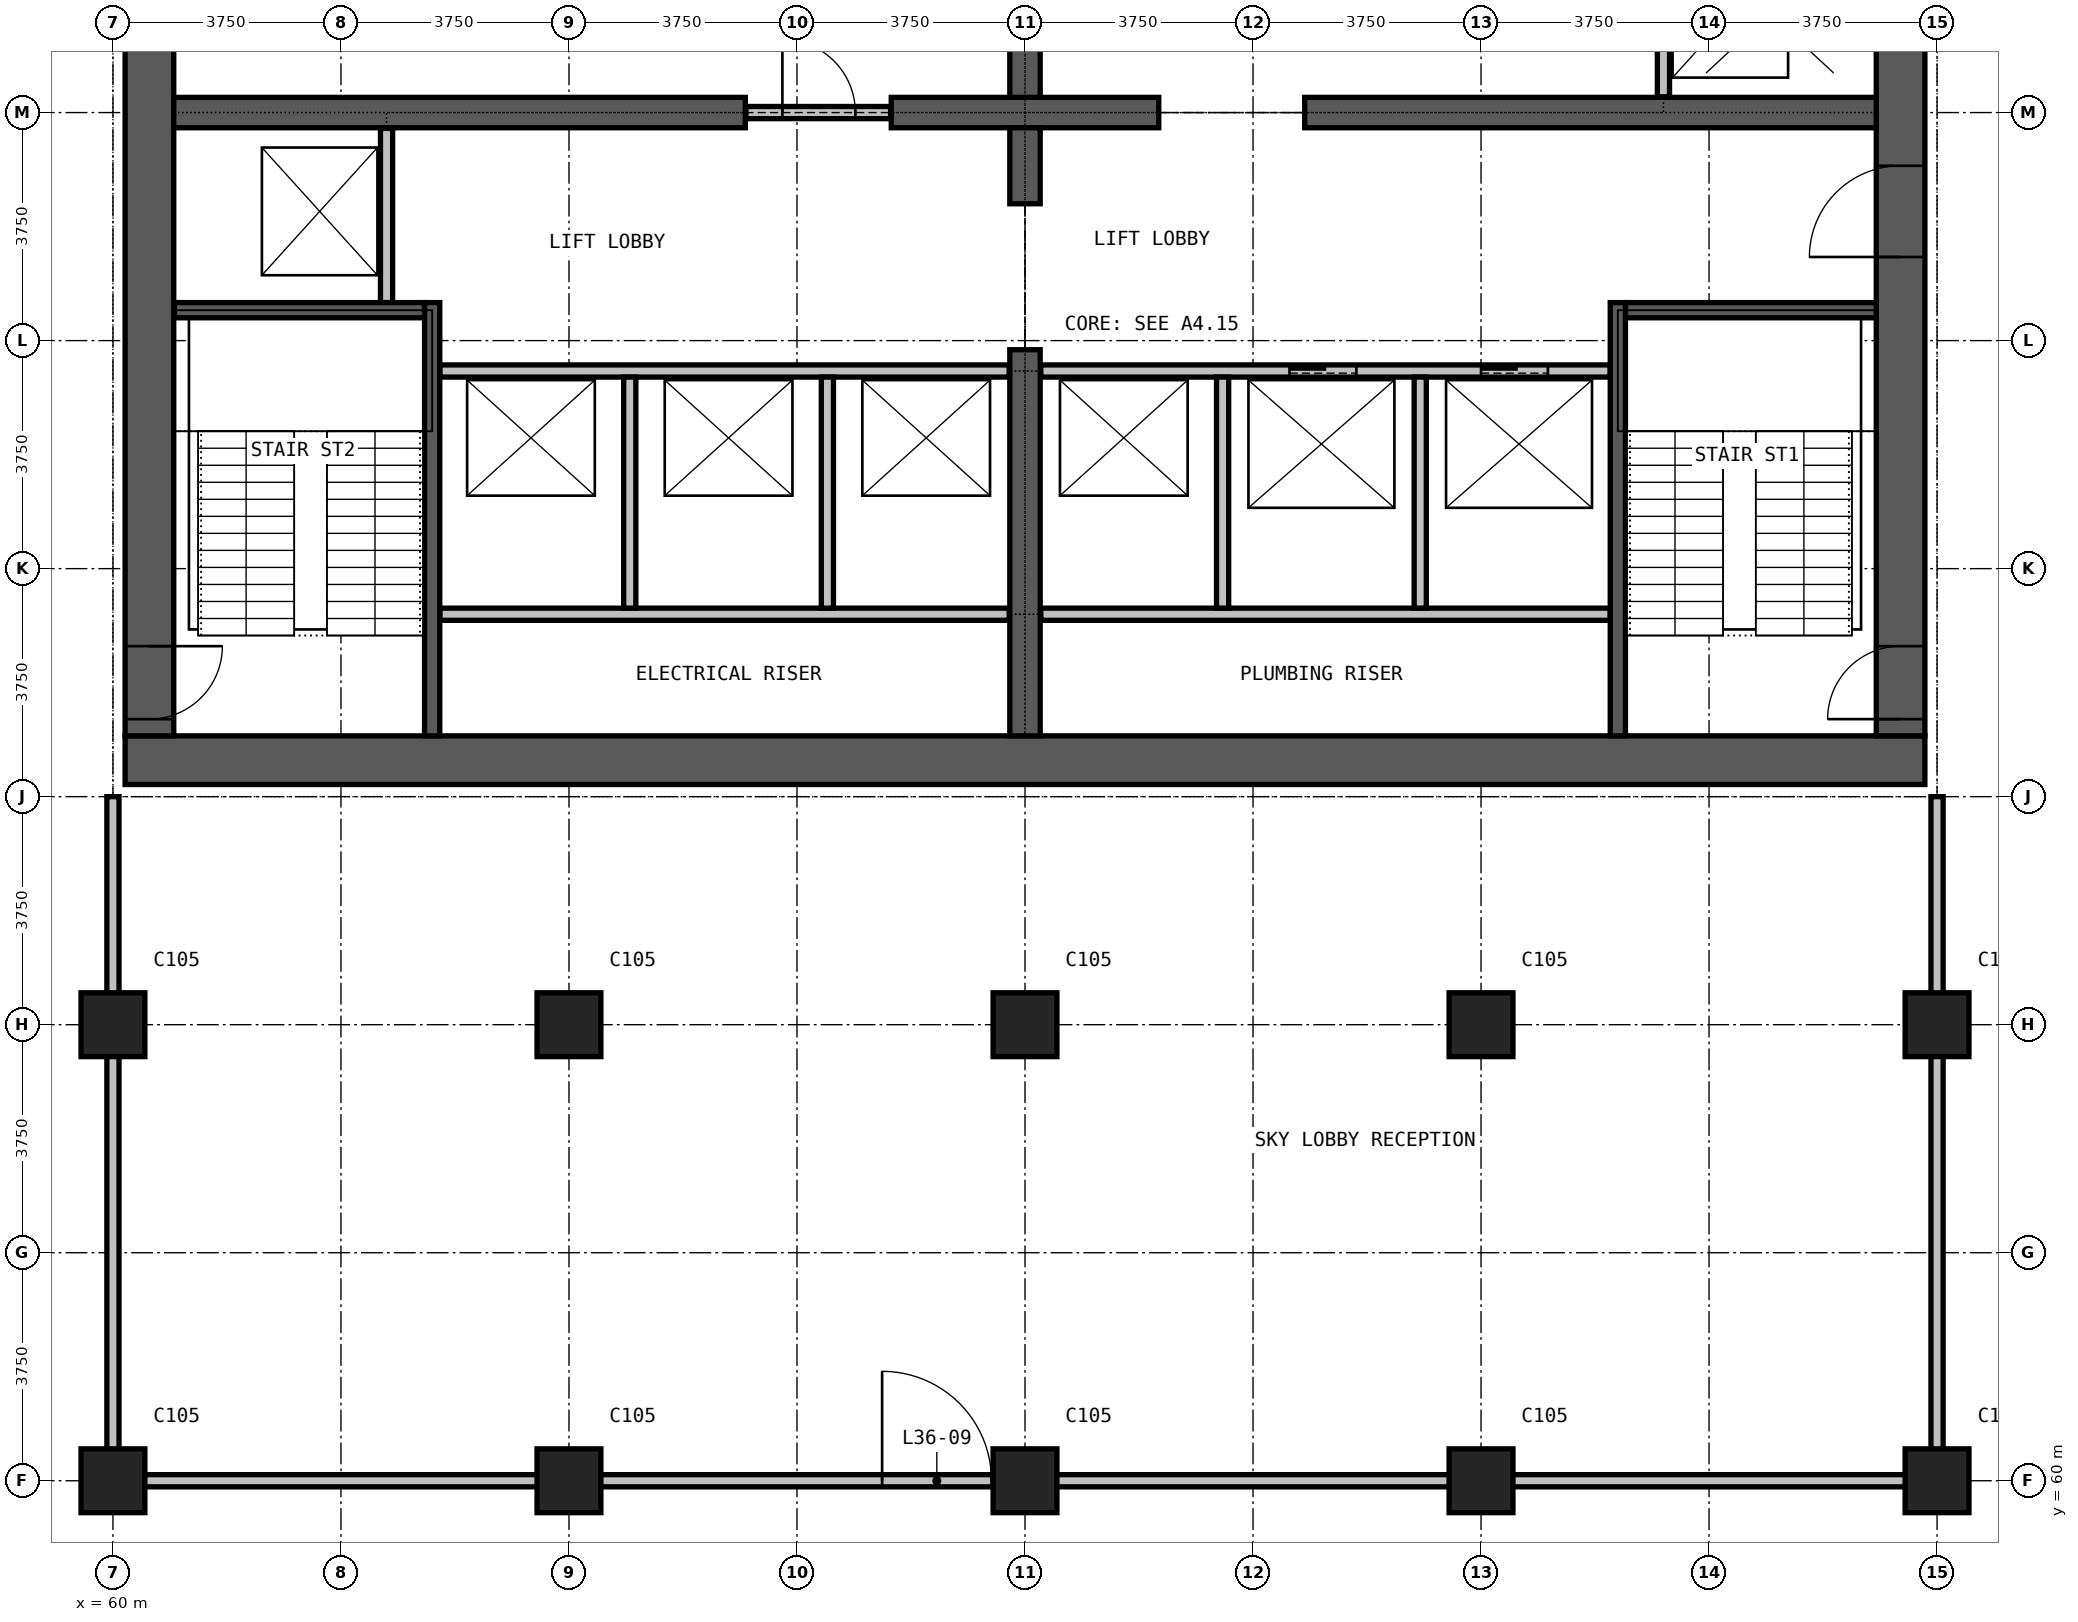
"""IFC4 building model, lengths in metres.
Left out: names, types, materials, properties, quantities, classifications, styles, units other than length and angle.
Written with IfcOpenShell. Run it as: python <this file> out.ifc"""

import sys

from ifc_helpers import new_model, si_unit, direction, frame, frame_2d, origin, origin_2d, place, context, subcontext, project, spatial, rectangle, extrude, element, fill, save


model = new_model("IFC4")
c1 = context("Model", 3, precision=1e-05, world=origin(), true_north=direction((0.0, 1.0)))
c2 = subcontext(c1, "Body", "Model", "MODEL_VIEW")
j1 = project(units=[si_unit("LENGTHUNIT", "METRE"), si_unit("PLANEANGLEUNIT", "RADIAN")], contexts=[c1])
p1 = place(None, origin())
s1 = spatial("IfcSite", under=j1, at=p1, CompositionType="ELEMENT")
p2 = place(p1, origin())
s2 = spatial("IfcBuilding", under=s1, at=p2, CompositionType="ELEMENT")
p3 = place(p2, frame((0.0, 0.0, 143.2)))
s3 = spatial("IfcBuildingStorey", under=s2, at=p3, CompositionType="ELEMENT", Elevation=143.2)
for number, where, z_axis, x_axis in (
    (1, (60.0, 60.0, 0.0), (0.0, 0.0, 1.0), (1.0, 0.0, 0.0)),
    (2, (60.0, 67.5, 0.0), (0.0, 0.0, 1.0), (1.0, 0.0, 0.0)),
    (3, (67.5, 60.0, 0.0), (0.0, 0.0, 1.0), (1.0, 0.0, 0.0)),
    (4, (67.5, 67.5, 0.0), (0.0, 0.0, 1.0), (1.0, 0.0, 0.0)),
    (5, (75.0, 60.0, 0.0), (0.0, 0.0, 1.0), (1.0, 0.0, 0.0)),
    (6, (75.0, 67.5, 0.0), (0.0, 0.0, 1.0), (1.0, 0.0, 0.0)),
    (7, (82.5, 60.0, 0.0), (0.0, 0.0, 1.0), (1.0, 0.0, 0.0)),
    (8, (82.5, 67.5, 0.0), (0.0, 0.0, 1.0), (1.0, 0.0, 0.0)),
    (9, (90.0, 60.0, 0.0), (0.0, 0.0, 1.0), (1.0, 0.0, 0.0)),
    (10, (90.0, 67.5, 0.0), (0.0, 0.0, 1.0), (1.0, 0.0, 0.0)),
):
    element("IfcColumn", number, at=place(p3, frame(where, z_axis=z_axis, x_axis=x_axis)), inside=s3, PredefinedType="COLUMN", context=c2, shape_type="SweptSolid", body=[
        extrude(rectangle(XDim=1.05, YDim=1.05, at=origin_2d()), origin(), (0.0, 0.0, 1.0), 4.5),
    ])
p4 = place(p3, frame((60.2, 71.85, 0.0), z_axis=(0.0, 0.0, 1.0), x_axis=(1.0, 0.0, 0.0)))
e11 = element("IfcWall", 11, at=p4, inside=s3, PredefinedType="SHEAR", context=c2, shape_type="SweptSolid", body=[
    extrude(rectangle(XDim=29.6, YDim=0.8, at=frame_2d((14.8, 0.0))), origin(), (0.0, 0.0, 1.0), 4.5),
])
p5 = place(p3, frame((89.4, 72.25, 0.0), z_axis=(0.0, 0.0, 1.0), x_axis=(0.0, 1.0, 0.0)))
e12 = element("IfcWall", 12, at=p5, inside=s3, PredefinedType="SHEAR", context=c2, shape_type="SweptSolid", body=[
    extrude(rectangle(XDim=20.5, YDim=0.8, at=frame_2d((10.25, 0.0))), origin(), (0.0, 0.0, 1.0), 4.5),
])
p6 = place(p5, frame((0.275, 0.0, 0.0)))
e13 = element("IfcOpeningElement", 13, at=p6, cuts=e12, PredefinedType="OPENING", context=c2, shape_type="SweptSolid", body=[
    extrude(rectangle(XDim=1.2, YDim=2.2, at=frame_2d((0.6, 1.1))), frame((0.0, 0.41, 0.0), z_axis=(0.0, -1.0, 0.0), x_axis=(1.0, 0.0, 0.0)), (0.0, 0.0, 1.0), 0.82),
])
p7 = place(p5, frame((13.775, 0.0, 0.0)))
e14 = element("IfcOpeningElement", 14, at=p7, cuts=e12, PredefinedType="OPENING", context=c2, shape_type="SweptSolid", body=[
    extrude(rectangle(XDim=1.2, YDim=2.2, at=frame_2d((0.6, 1.1))), frame((0.0, 0.41, 0.0), z_axis=(0.0, -1.0, 0.0), x_axis=(1.0, 0.0, 0.0)), (0.0, 0.0, 1.0), 0.82),
])
p8 = place(p5, frame((7.875, 0.0, 0.0)))
e15 = element("IfcOpeningElement", 15, at=p8, cuts=e12, PredefinedType="OPENING", context=c2, shape_type="SweptSolid", body=[
    extrude(rectangle(XDim=1.5, YDim=2.2, at=frame_2d((0.75, 1.1))), frame((0.0, 0.41, 0.0), z_axis=(0.0, -1.0, 0.0), x_axis=(1.0, 0.0, 0.0)), (0.0, 0.0, 1.0), 0.82),
])
p9 = place(p3, frame((60.6, 92.75, 0.0), z_axis=(0.0, 0.0, 1.0), x_axis=(0.0, -1.0, 0.0)))
e16 = element("IfcWall", 16, at=p9, inside=s3, PredefinedType="SHEAR", context=c2, shape_type="SweptSolid", body=[
    extrude(rectangle(XDim=20.5, YDim=0.8, at=frame_2d((10.25, 0.0))), origin(), (0.0, 0.0, 1.0), 4.5),
])
p10 = place(p9, frame((19.025, 0.0, 0.0)))
e17 = element("IfcOpeningElement", 17, at=p10, cuts=e16, PredefinedType="OPENING", context=c2, shape_type="SweptSolid", body=[
    extrude(rectangle(XDim=1.2, YDim=2.2, at=frame_2d((0.6, 1.1))), frame((0.0, 0.41, 0.0), z_axis=(0.0, -1.0, 0.0), x_axis=(1.0, 0.0, 0.0)), (0.0, 0.0, 1.0), 0.82),
])
p11 = place(p9, frame((8.025, 0.0, 0.0)))
e18 = element("IfcOpeningElement", 18, at=p11, cuts=e16, PredefinedType="OPENING", context=c2, shape_type="SweptSolid", body=[
    extrude(rectangle(XDim=1.2, YDim=2.2, at=frame_2d((0.6, 1.1))), frame((0.0, 0.41, 0.0), z_axis=(0.0, -1.0, 0.0), x_axis=(1.0, 0.0, 0.0)), (0.0, 0.0, 1.0), 0.82),
])
p12 = place(p3, frame((61.0, 82.5, 0.0), z_axis=(0.0, 0.0, 1.0), x_axis=(1.0, 0.0, 0.0)))
e19 = element("IfcWall", 19, at=p12, inside=s3, PredefinedType="SHEAR", context=c2, shape_type="SweptSolid", body=[
    extrude(rectangle(XDim=9.4, YDim=0.5, at=frame_2d((4.7, 0.0))), origin(), (0.0, 0.0, 1.0), 4.5),
])
p13 = place(p3, frame((72.8, 82.5, 0.0), z_axis=(0.0, 0.0, 1.0), x_axis=(1.0, 0.0, 0.0)))
e20 = element("IfcWall", 20, at=p13, inside=s3, PredefinedType="SHEAR", context=c2, shape_type="SweptSolid", body=[
    extrude(rectangle(XDim=4.4, YDim=0.5, at=frame_2d((2.2, 0.0))), origin(), (0.0, 0.0, 1.0), 4.5),
])
p14 = place(p3, frame((79.6, 82.5, 0.0), z_axis=(0.0, 0.0, 1.0), x_axis=(1.0, 0.0, 0.0)))
e21 = element("IfcWall", 21, at=p14, inside=s3, PredefinedType="SHEAR", context=c2, shape_type="SweptSolid", body=[
    extrude(rectangle(XDim=9.4, YDim=0.5, at=frame_2d((4.7, 0.0))), origin(), (0.0, 0.0, 1.0), 4.5),
])
p15 = place(p3, frame((75.0, 72.25, 0.0), z_axis=(0.0, 0.0, 1.0), x_axis=(0.0, 1.0, 0.0)))
e22 = element("IfcWall", 22, at=p15, inside=s3, PredefinedType="SHEAR", context=c2, shape_type="SweptSolid", body=[
    extrude(rectangle(XDim=6.35, YDim=0.5, at=frame_2d((3.175, 0.0))), origin(), (0.0, 0.0, 1.0), 4.5),
])
for number, where, z_axis, x_axis in (
    (23, (75.0, 81.0, 0.0), (0.0, 0.0, 1.0), (0.0, 1.0, 0.0)),
    (24, (75.0, 82.75, 0.0), (0.0, 0.0, 1.0), (0.0, 1.0, 0.0)),
):
    element("IfcWall", number, at=place(p3, frame(where, z_axis=z_axis, x_axis=x_axis)), inside=s3, PredefinedType="SHEAR", context=c2, shape_type="SweptSolid", body=[
        extrude(rectangle(XDim=1.25, YDim=0.5, at=frame_2d((0.625, 0.0))), origin(), (0.0, 0.0, 1.0), 4.5),
    ])
p16 = place(p3, frame((70.41, 82.5, 0.0), z_axis=(0.0, 0.0, 1.0), x_axis=(1.0, 0.0, 0.0)))
e25 = element("IfcWall", 25, at=p16, inside=s3, PredefinedType="PARTITIONING", context=c2, shape_type="SweptSolid", body=[
    extrude(rectangle(XDim=2.38, YDim=0.2, at=frame_2d((1.19, 0.0))), origin(), (0.0, 0.0, 1.0), 2.4),
])
p17 = place(p16, frame((0.6, 0.0, 0.0)))
e26 = element("IfcOpeningElement", 26, at=p17, cuts=e25, PredefinedType="OPENING", context=c2, shape_type="SweptSolid", body=[
    extrude(rectangle(XDim=1.2, YDim=2.2, at=frame_2d((0.6, 1.1))), frame((0.0, 0.11, 0.0), z_axis=(0.0, -1.0, 0.0), x_axis=(1.0, 0.0, 0.0)), (0.0, 0.0, 1.0), 0.22),
])
p18 = place(p3, frame((60.1, 60.0, 0.0), z_axis=(0.0, 0.0, 1.0), x_axis=(1.0, 0.0, 0.0)))
e27 = element("IfcWall", 27, at=p18, inside=s3, PredefinedType="PARTITIONING", context=c2, shape_type="SweptSolid", body=[
    extrude(rectangle(XDim=29.8, YDim=0.2, at=frame_2d((14.9, 0.0))), origin(), (0.0, 0.0, 1.0), 4.2),
])
p19 = place(p18, frame((12.55, 0.0, 0.0)))
e28 = element("IfcOpeningElement", 28, at=p19, cuts=e27, PredefinedType="OPENING", context=c2, shape_type="SweptSolid", body=[
    extrude(rectangle(XDim=1.8, YDim=2.2, at=frame_2d((0.9, 1.1))), frame((0.0, 0.11, 0.0), z_axis=(0.0, -1.0, 0.0), x_axis=(1.0, 0.0, 0.0)), (0.0, 0.0, 1.0), 0.22),
])
for number, where, z_axis, x_axis in (
    (29, (60.0, 59.9, 0.0), (0.0, 0.0, 1.0), (0.0, 1.0, 0.0)),
    (30, (90.0, 59.9, 0.0), (0.0, 0.0, 1.0), (0.0, 1.0, 0.0)),
):
    element("IfcWall", number, at=place(p3, frame(where, z_axis=z_axis, x_axis=x_axis)), inside=s3, PredefinedType="PARTITIONING", context=c2, shape_type="SweptSolid", body=[
        extrude(rectangle(XDim=11.35, YDim=0.2, at=frame_2d((5.675, 0.0))), origin(), (0.0, 0.0, 1.0), 4.2),
    ])
for number, where, z_axis, x_axis in (
    (31, (65.375, 74.25, 0.0), (0.0, 0.0, 1.0), (1.0, 0.0, 0.0)),
    (32, (75.26, 74.25, 0.0), (0.0, 0.0, 1.0), (1.0, 0.0, 0.0)),
    (33, (65.375, 78.25, 0.0), (0.0, 0.0, 1.0), (1.0, 0.0, 0.0)),
):
    element("IfcWall", number, at=place(p3, frame(where, z_axis=z_axis, x_axis=x_axis)), inside=s3, PredefinedType="PARTITIONING", context=c2, shape_type="SweptSolid", body=[
        extrude(rectangle(XDim=9.365, YDim=0.2, at=frame_2d((4.683, 0.0))), origin(), (0.0, 0.0, 1.0), 4.2),
    ])
p20 = place(p3, frame((75.26, 78.25, 0.0), z_axis=(0.0, 0.0, 1.0), x_axis=(1.0, 0.0, 0.0)))
e34 = element("IfcWall", 34, at=p20, inside=s3, PredefinedType="PARTITIONING", context=c2, shape_type="SweptSolid", body=[
    extrude(rectangle(XDim=9.365, YDim=0.2, at=frame_2d((4.683, 0.0))), origin(), (0.0, 0.0, 1.0), 4.2),
])
p21 = place(p20, frame((4.09, 0.0, 0.0)))
e35 = element("IfcOpeningElement", 35, at=p21, cuts=e34, PredefinedType="OPENING", context=c2, shape_type="SweptSolid", body=[
    extrude(rectangle(XDim=1.1, YDim=2.2, at=frame_2d((0.55, 1.1))), frame((0.0, 0.11, 0.0), z_axis=(0.0, -1.0, 0.0), x_axis=(1.0, 0.0, 0.0)), (0.0, 0.0, 1.0), 0.22),
])
p22 = place(p20, frame((7.24, 0.0, 0.0)))
e36 = element("IfcOpeningElement", 36, at=p22, cuts=e34, PredefinedType="OPENING", context=c2, shape_type="SweptSolid", body=[
    extrude(rectangle(XDim=1.1, YDim=2.2, at=frame_2d((0.55, 1.1))), frame((0.0, 0.11, 0.0), z_axis=(0.0, -1.0, 0.0), x_axis=(1.0, 0.0, 0.0)), (0.0, 0.0, 1.0), 0.22),
])
p23 = place(p3, frame((64.5, 79.375, 0.0), z_axis=(0.0, 0.0, 1.0), x_axis=(0.0, 1.0, 0.0)))
e37 = element("IfcWall", 37, at=p23, inside=s3, PredefinedType="PARTITIONING", context=c2, shape_type="SweptSolid", body=[
    extrude(rectangle(XDim=2.865, YDim=0.2, at=frame_2d((1.433, 0.0))), origin(), (0.0, 0.0, 1.0), 4.2),
])
for number, where, z_axis, x_axis in (
    (38, (68.5, 74.35, 0.0), (0.0, 0.0, 1.0), (0.0, 1.0, 0.0)),
    (39, (71.75, 74.35, 0.0), (0.0, 0.0, 1.0), (0.0, 1.0, 0.0)),
    (40, (78.25, 74.35, 0.0), (0.0, 0.0, 1.0), (0.0, 1.0, 0.0)),
    (41, (81.5, 74.35, 0.0), (0.0, 0.0, 1.0), (0.0, 1.0, 0.0)),
):
    element("IfcWall", number, at=place(p3, frame(where, z_axis=z_axis, x_axis=x_axis)), inside=s3, PredefinedType="PARTITIONING", context=c2, shape_type="SweptSolid", body=[
        extrude(rectangle(XDim=3.8, YDim=0.2, at=frame_2d((1.9, 0.0))), origin(), (0.0, 0.0, 1.0), 4.2),
    ])
p24 = place(p3, frame((85.5, 82.76, 0.0), z_axis=(0.0, 0.0, 1.0), x_axis=(0.0, 1.0, 0.0)))
e42 = element("IfcWall", 42, at=p24, inside=s3, PredefinedType="PARTITIONING", context=c2, shape_type="SweptSolid", body=[
    extrude(rectangle(XDim=2.865, YDim=0.2, at=frame_2d((1.433, 0.0))), origin(), (0.0, 0.0, 1.0), 4.2),
])
p25 = place(p24, frame((0.9, 0.0, 0.0)))
e43 = element("IfcOpeningElement", 43, at=p25, cuts=e42, PredefinedType="OPENING", context=c2, shape_type="SweptSolid", body=[
    extrude(rectangle(XDim=1.1, YDim=2.2, at=frame_2d((0.55, 1.1))), frame((0.0, 0.11, 0.0), z_axis=(0.0, -1.0, 0.0), x_axis=(1.0, 0.0, 0.0)), (0.0, 0.0, 1.0), 0.22),
])
p26 = place(p3, frame((61.01, 79.25, 0.0), z_axis=(0.0, 0.0, 1.0), x_axis=(1.0, 0.0, 0.0)))
e44 = element("IfcWall", 44, at=p26, inside=s3, PredefinedType="PARTITIONING", context=c2, shape_type="SweptSolid", body=[
    extrude(rectangle(XDim=4.115, YDim=0.25, at=frame_2d((2.058, 0.0))), origin(), (0.0, 0.0, 1.0), 4.2),
])
p27 = place(p3, frame((84.875, 79.25, 0.0), z_axis=(0.0, 0.0, 1.0), x_axis=(1.0, 0.0, 0.0)))
e45 = element("IfcWall", 45, at=p27, inside=s3, PredefinedType="PARTITIONING", context=c2, shape_type="SweptSolid", body=[
    extrude(rectangle(XDim=4.125, YDim=0.25, at=frame_2d((2.062, 0.0))), origin(), (0.0, 0.0, 1.0), 4.2),
])
for number, where, z_axis, x_axis in (
    (46, (65.25, 72.25, 0.0), (0.0, 0.0, 1.0), (0.0, 1.0, 0.0)),
    (47, (84.75, 72.25, 0.0), (0.0, 0.0, 1.0), (0.0, 1.0, 0.0)),
):
    element("IfcWall", number, at=place(p3, frame(where, z_axis=z_axis, x_axis=x_axis)), inside=s3, PredefinedType="PARTITIONING", context=c2, shape_type="SweptSolid", body=[
        extrude(rectangle(XDim=7.125, YDim=0.25, at=frame_2d((3.562, 0.0))), origin(), (0.0, 0.0, 1.0), 4.2),
    ])
p28 = place(p21, origin())
e48 = element("IfcDoor", 48, at=p28, inside=s3, OperationType="DOUBLE_DOOR_SLIDING", PredefinedType="DOOR", context=c2, shape_type="SweptSolid", body=[
    extrude(rectangle(XDim=1.1, YDim=2.2, at=frame_2d((0.55, 1.1))), frame((0.0, 0.025, 0.0), z_axis=(0.0, -1.0, 0.0), x_axis=(1.0, 0.0, 0.0)), (0.0, 0.0, 1.0), 0.05),
])
fill(e35, e48)
p29 = place(p22, origin())
e49 = element("IfcDoor", 49, at=p29, inside=s3, OperationType="DOUBLE_DOOR_SLIDING", PredefinedType="DOOR", context=c2, shape_type="SweptSolid", body=[
    extrude(rectangle(XDim=1.1, YDim=2.2, at=frame_2d((0.55, 1.1))), frame((0.0, 0.025, 0.0), z_axis=(0.0, -1.0, 0.0), x_axis=(1.0, 0.0, 0.0)), (0.0, 0.0, 1.0), 0.05),
])
fill(e36, e49)
p30 = place(p17, origin())
e50 = element("IfcDoor", 50, at=p30, inside=s3, OperationType="SINGLE_SWING_LEFT", PredefinedType="DOOR", context=c2, shape_type="SweptSolid", body=[
    extrude(rectangle(XDim=1.2, YDim=2.2, at=frame_2d((0.6, 1.1))), frame((0.0, 0.025, 0.0), z_axis=(0.0, -1.0, 0.0), x_axis=(1.0, 0.0, 0.0)), (0.0, 0.0, 1.0), 0.05),
])
fill(e26, e50)
p31 = place(p6, origin())
e51 = element("IfcDoor", 51, at=p31, inside=s3, OperationType="SINGLE_SWING_LEFT", PredefinedType="DOOR", context=c2, shape_type="SweptSolid", body=[
    extrude(rectangle(XDim=1.2, YDim=2.2, at=frame_2d((0.6, 1.1))), frame((0.0, 0.025, 0.0), z_axis=(0.0, -1.0, 0.0), x_axis=(1.0, 0.0, 0.0)), (0.0, 0.0, 1.0), 0.05),
])
fill(e13, e51)
p32 = place(p10, origin())
e52 = element("IfcDoor", 52, at=p32, inside=s3, OperationType="SINGLE_SWING_LEFT", PredefinedType="DOOR", context=c2, shape_type="SweptSolid", body=[
    extrude(rectangle(XDim=1.2, YDim=2.2, at=frame_2d((0.6, 1.1))), frame((0.0, 0.025, 0.0), z_axis=(0.0, -1.0, 0.0), x_axis=(1.0, 0.0, 0.0)), (0.0, 0.0, 1.0), 0.05),
])
fill(e17, e52)
p33 = place(p8, origin())
e53 = element("IfcDoor", 53, at=p33, inside=s3, OperationType="DOUBLE_DOOR_SINGLE_SWING", PredefinedType="DOOR", context=c2, shape_type="SweptSolid", body=[
    extrude(rectangle(XDim=1.5, YDim=2.2, at=frame_2d((0.75, 1.1))), frame((0.0, 0.025, 0.0), z_axis=(0.0, -1.0, 0.0), x_axis=(1.0, 0.0, 0.0)), (0.0, 0.0, 1.0), 0.05),
])
fill(e15, e53)
p34 = place(p19, origin())
e54 = element("IfcDoor", 54, at=p34, inside=s3, OperationType="DOUBLE_DOOR_SINGLE_SWING", PredefinedType="DOOR", context=c2, shape_type="SweptSolid", body=[
    extrude(rectangle(XDim=1.8, YDim=2.2, at=frame_2d((0.9, 1.1))), frame((0.0, 0.025, 0.0), z_axis=(0.0, -1.0, 0.0), x_axis=(1.0, 0.0, 0.0)), (0.0, 0.0, 1.0), 0.05),
])
fill(e28, e54)
save(model, sys.argv[1])
